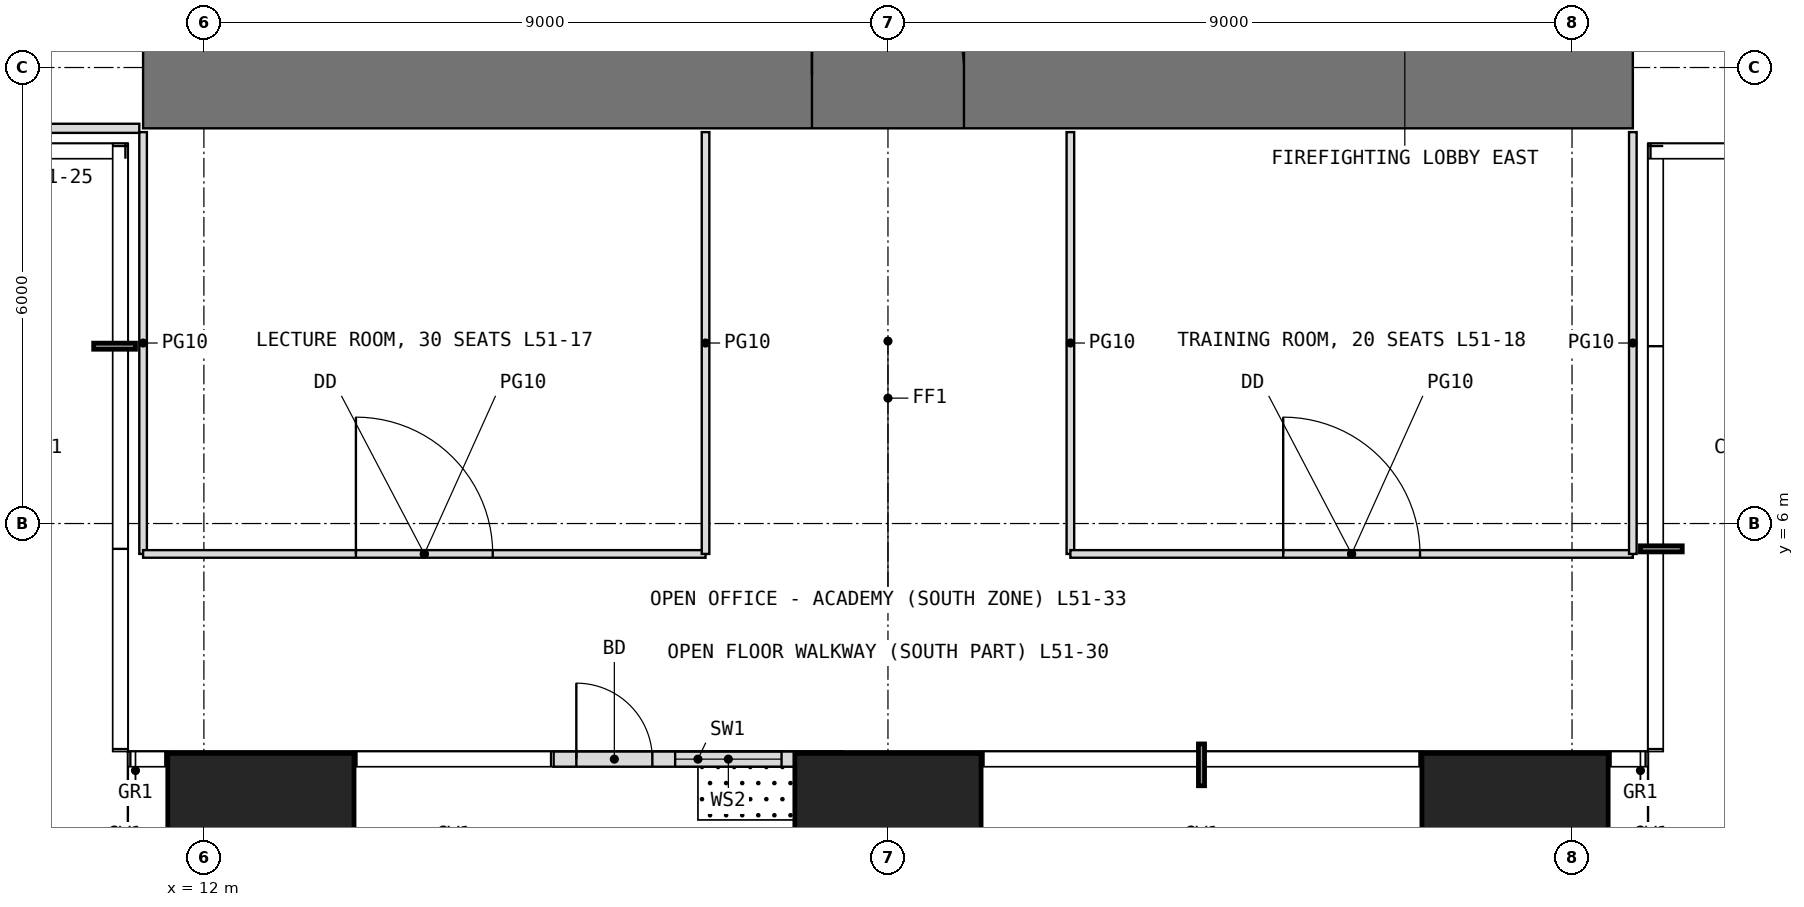
"""IFC4 building model, lengths in metres.
Left out: names, types, materials, properties, quantities, classifications, styles, units other than length and angle.
Written with IfcOpenShell. Run it as: python <this file> out.ifc"""

import sys

from ifc_helpers import new_model, si_unit, direction, frame, frame_2d, origin, origin_2d, place, context, subcontext, project, spatial, rectangle, extrude, element, fill, save


model = new_model("IFC4")
c1 = context("Model", 3, precision=1e-05, world=origin(), true_north=direction((0.0, 1.0)))
c2 = subcontext(c1, "Body", "Model", "MODEL_VIEW")
j1 = project(units=[si_unit("LENGTHUNIT", "METRE"), si_unit("PLANEANGLEUNIT", "RADIAN")], contexts=[c1])
p1 = place(None, origin())
s1 = spatial("IfcSite", under=j1, at=p1, CompositionType="ELEMENT")
p2 = place(p1, origin())
s2 = spatial("IfcBuilding", under=s1, at=p2, CompositionType="ELEMENT")
p3 = place(p2, frame((0.0, 0.0, 214.5)))
s3 = spatial("IfcBuildingStorey", under=s2, at=p3, CompositionType="ELEMENT", Elevation=214.5)
for number, where, z_axis, x_axis in (
    (1, (12.75, 1.75, 0.0), (0.0, 0.0, 1.0), (1.0, 0.0, 0.0)),
    (2, (21.0, 1.75, 0.0), (0.0, 0.0, 1.0), (1.0, 0.0, 0.0)),
    (3, (29.25, 1.75, 0.0), (0.0, 0.0, 1.0), (1.0, 0.0, 0.0)),
):
    element("IfcColumn", number, at=place(p3, frame(where, z_axis=z_axis, x_axis=x_axis)), inside=s3, PredefinedType="COLUMN", context=c2, shape_type="SweptSolid", body=[
        extrude(rectangle(XDim=2.45, YDim=2.45, at=origin_2d()), origin(), (0.0, 0.0, 1.0), 4.0),
    ])
p4 = place(p3, frame((16.6, 2.9, 0.0), z_axis=(0.0, 0.0, 1.0), x_axis=(1.0, 0.0, 0.0)))
e4 = element("IfcWall", 4, at=p4, inside=s3, PredefinedType="USERDEFINED", context=c2, shape_type="SweptSolid", body=[
    extrude(rectangle(XDim=3.8, YDim=0.2, at=frame_2d((1.9, 0.0))), origin(), (0.0, 0.0, 1.0), 3.75),
])
p5 = place(p4, frame((0.3, 0.0, 0.0)))
e5 = element("IfcOpeningElement", 5, at=p5, cuts=e4, PredefinedType="OPENING", context=c2, shape_type="SweptSolid", body=[
    extrude(rectangle(XDim=1.0, YDim=2.4, at=frame_2d((0.5, 1.2))), frame((0.0, 0.11, 0.0), z_axis=(0.0, -1.0, 0.0), x_axis=(1.0, 0.0, 0.0)), (0.0, 0.0, 1.0), 0.22),
])
p6 = place(p4, frame((1.6, 0.0, 0.3)))
e6 = element("IfcOpeningElement", 6, at=p6, cuts=e4, PredefinedType="OPENING", context=c2, shape_type="SweptSolid", body=[
    extrude(rectangle(XDim=1.4, YDim=2.7, at=frame_2d((0.7, 1.35))), frame((0.0, 0.11, 0.0), z_axis=(0.0, -1.0, 0.0), x_axis=(1.0, 0.0, 0.0)), (0.0, 0.0, 1.0), 0.22),
])
p7 = place(p3, frame((11.2, 11.9, -0.05), z_axis=(0.0, 0.0, 1.0), x_axis=(1.0, 0.0, 0.0)))
e7 = element("IfcWall", 7, at=p7, inside=s3, PredefinedType="SHEAR", context=c2, shape_type="SweptSolid", body=[
    extrude(rectangle(XDim=19.6, YDim=1.4, at=frame_2d((9.8, 0.0))), origin(), (0.0, 0.0, 1.0), 4.0),
])
p8 = place(p7, frame((8.8, 0.0, 0.05)))
e8 = element("IfcOpeningElement", 8, at=p8, cuts=e7, PredefinedType="OPENING", context=c2, shape_type="SweptSolid", body=[
    extrude(rectangle(XDim=2.0, YDim=2.2, at=frame_2d((1.0, 1.1))), frame((0.0, 0.71, 0.0), z_axis=(0.0, -1.0, 0.0), x_axis=(1.0, 0.0, 0.0)), (0.0, 0.0, 1.0), 1.42),
])
p9 = place(p3, frame((8.5, 11.2, 0.0), z_axis=(0.0, 0.0, 1.0), x_axis=(1.0, 0.0, 0.0)))
e9 = element("IfcWall", 9, at=p9, inside=s3, PredefinedType="PARTITIONING", context=c2, shape_type="SweptSolid", body=[
    extrude(rectangle(XDim=2.65, YDim=0.12, at=frame_2d((1.325, 0.0))), origin(), (0.0, 0.0, 1.0), 3.75),
])
p10 = place(p3, frame((11.2, 5.6, 0.0), z_axis=(0.0, 0.0, 1.0), x_axis=(0.0, 1.0, 0.0)))
e10 = element("IfcWall", 10, at=p10, inside=s3, PredefinedType="PARTITIONING", context=c2, shape_type="SweptSolid", body=[
    extrude(rectangle(XDim=5.55, YDim=0.1, at=frame_2d((2.775, 0.0))), origin(), (0.0, 0.0, 1.0), 3.75),
])
p11 = place(p3, frame((11.2, 5.6, 0.0), z_axis=(0.0, 0.0, 1.0), x_axis=(1.0, 0.0, 0.0)))
e11 = element("IfcWall", 11, at=p11, inside=s3, PredefinedType="PARTITIONING", context=c2, shape_type="SweptSolid", body=[
    extrude(rectangle(XDim=7.4, YDim=0.1, at=frame_2d((3.7, 0.0))), origin(), (0.0, 0.0, 1.0), 3.75),
])
p12 = place(p11, frame((2.8, 0.0, 0.0)))
e12 = element("IfcOpeningElement", 12, at=p12, cuts=e11, PredefinedType="OPENING", context=c2, shape_type="SweptSolid", body=[
    extrude(rectangle(XDim=1.8, YDim=2.4, at=frame_2d((0.9, 1.2))), frame((0.0, 0.06, 0.0), z_axis=(0.0, -1.0, 0.0), x_axis=(1.0, 0.0, 0.0)), (0.0, 0.0, 1.0), 0.12),
])
for number, where, z_axis, x_axis in (
    (13, (18.6, 5.6, 0.0), (0.0, 0.0, 1.0), (0.0, 1.0, 0.0)),
    (14, (23.4, 5.6, 0.0), (0.0, 0.0, 1.0), (0.0, 1.0, 0.0)),
):
    element("IfcWall", number, at=place(p3, frame(where, z_axis=z_axis, x_axis=x_axis)), inside=s3, PredefinedType="PARTITIONING", context=c2, shape_type="SweptSolid", body=[
        extrude(rectangle(XDim=5.55, YDim=0.1, at=frame_2d((2.775, 0.0))), origin(), (0.0, 0.0, 1.0), 3.75),
    ])
p13 = place(p3, frame((23.4, 5.6, 0.0), z_axis=(0.0, 0.0, 1.0), x_axis=(1.0, 0.0, 0.0)))
e15 = element("IfcWall", 15, at=p13, inside=s3, PredefinedType="PARTITIONING", context=c2, shape_type="SweptSolid", body=[
    extrude(rectangle(XDim=7.4, YDim=0.1, at=frame_2d((3.7, 0.0))), origin(), (0.0, 0.0, 1.0), 3.75),
])
p14 = place(p13, frame((2.8, 0.0, 0.0)))
e16 = element("IfcOpeningElement", 16, at=p14, cuts=e15, PredefinedType="OPENING", context=c2, shape_type="SweptSolid", body=[
    extrude(rectangle(XDim=1.8, YDim=2.4, at=frame_2d((0.9, 1.2))), frame((0.0, 0.06, 0.0), z_axis=(0.0, -1.0, 0.0), x_axis=(1.0, 0.0, 0.0)), (0.0, 0.0, 1.0), 0.12),
])
p15 = place(p3, frame((30.8, 5.6, 0.0), z_axis=(0.0, 0.0, 1.0), x_axis=(0.0, 1.0, 0.0)))
e17 = element("IfcWall", 17, at=p15, inside=s3, PredefinedType="PARTITIONING", context=c2, shape_type="SweptSolid", body=[
    extrude(rectangle(XDim=5.55, YDim=0.1, at=frame_2d((2.775, 0.0))), origin(), (0.0, 0.0, 1.0), 3.75),
])
p16 = place(p5, origin())
e18 = element("IfcDoor", 18, at=p16, inside=s3, OperationType="SINGLE_SWING_LEFT", PredefinedType="DOOR", context=c2, shape_type="SweptSolid", body=[
    extrude(rectangle(XDim=1.0, YDim=2.4, at=frame_2d((0.5, 1.2))), frame((0.0, 0.025, 0.0), z_axis=(0.0, -1.0, 0.0), x_axis=(1.0, 0.0, 0.0)), (0.0, 0.0, 1.0), 0.05),
])
fill(e5, e18)
p17 = place(p6, origin())
e19 = element("IfcWindow", 19, at=p17, inside=s3, PartitioningType="SINGLE_PANEL", PredefinedType="WINDOW", context=c2, shape_type="SweptSolid", body=[
    extrude(rectangle(XDim=1.4, YDim=2.7, at=frame_2d((0.7, 1.35))), frame((0.0, 0.03, 0.0), z_axis=(0.0, -1.0, 0.0), x_axis=(1.0, 0.0, 0.0)), (0.0, 0.0, 1.0), 0.06),
])
fill(e6, e19)
p18 = place(p8, origin())
e20 = element("IfcDoor", 20, at=p18, inside=s3, OperationType="DOUBLE_DOOR_SINGLE_SWING", PredefinedType="DOOR", context=c2, shape_type="SweptSolid", body=[
    extrude(rectangle(XDim=2.0, YDim=2.2, at=frame_2d((1.0, 1.1))), frame((0.0, 0.025, 0.0), z_axis=(0.0, -1.0, 0.0), x_axis=(1.0, 0.0, 0.0)), (0.0, 0.0, 1.0), 0.05),
])
fill(e8, e20)
p19 = place(p12, origin())
e21 = element("IfcDoor", 21, at=p19, inside=s3, OperationType="DOUBLE_DOOR_SINGLE_SWING", PredefinedType="DOOR", context=c2, shape_type="SweptSolid", body=[
    extrude(rectangle(XDim=1.8, YDim=2.4, at=frame_2d((0.9, 1.2))), frame((0.0, 0.025, 0.0), z_axis=(0.0, -1.0, 0.0), x_axis=(1.0, 0.0, 0.0)), (0.0, 0.0, 1.0), 0.05),
])
fill(e12, e21)
p20 = place(p14, origin())
e22 = element("IfcDoor", 22, at=p20, inside=s3, OperationType="DOUBLE_DOOR_SINGLE_SWING", PredefinedType="DOOR", context=c2, shape_type="SweptSolid", body=[
    extrude(rectangle(XDim=1.8, YDim=2.4, at=frame_2d((0.9, 1.2))), frame((0.0, 0.025, 0.0), z_axis=(0.0, -1.0, 0.0), x_axis=(1.0, 0.0, 0.0)), (0.0, 0.0, 1.0), 0.05),
])
fill(e16, e22)
save(model, sys.argv[1])
